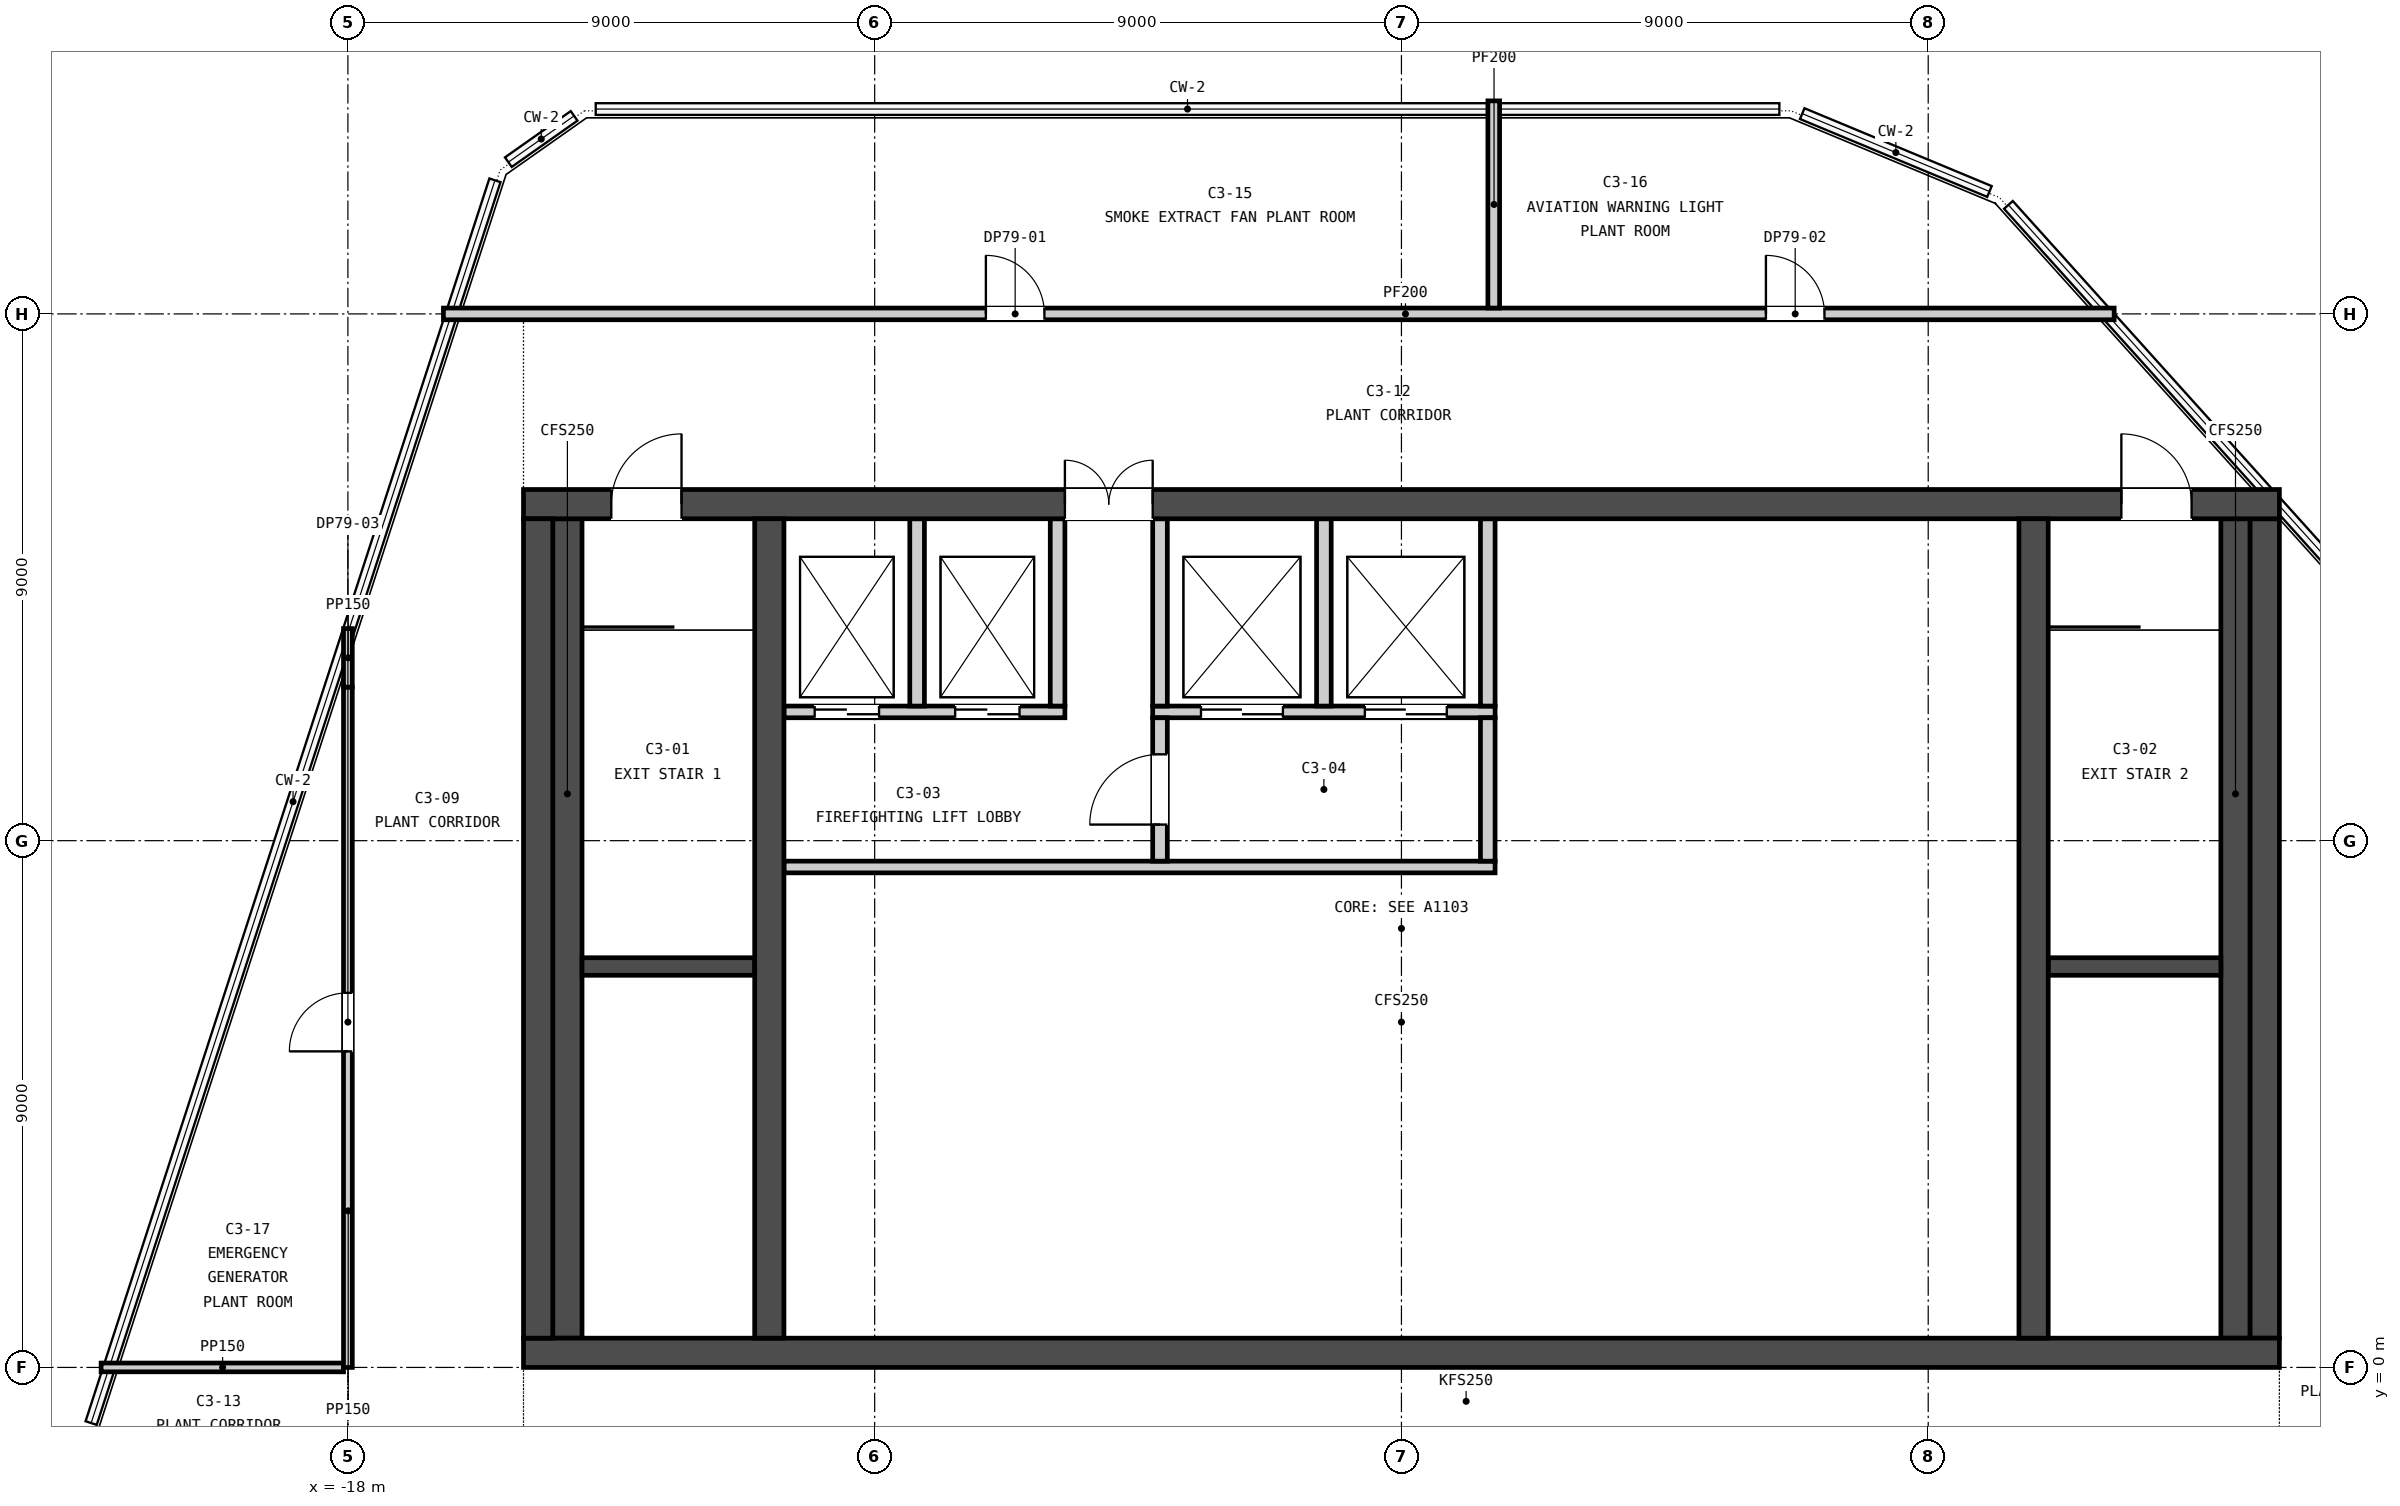
"""IFC4 building model, lengths in metres.
Left out: names, types, materials, properties, quantities, classifications, styles, units other than length and angle.
Written with IfcOpenShell. Run it as: python <this file> out.ifc"""

import sys

from ifc_helpers import new_model, si_unit, direction, frame, frame_2d, origin, place, context, subcontext, project, spatial, rectangle, extrude, element, fill, save


model = new_model("IFC4")
c1 = context("Model", 3, precision=1e-05, world=origin(), true_north=direction((0.0, 1.0)))
c2 = subcontext(c1, "Body", "Model", "MODEL_VIEW")
j1 = project(units=[si_unit("LENGTHUNIT", "METRE"), si_unit("PLANEANGLEUNIT", "RADIAN")], contexts=[c1])
p1 = place(None, origin())
s1 = spatial("IfcSite", under=j1, at=p1, CompositionType="ELEMENT")
p2 = place(p1, origin())
s2 = spatial("IfcBuilding", under=s1, at=p2, CompositionType="ELEMENT")
p3 = place(p2, frame((0.0, 0.0, 311.1)))
s3 = spatial("IfcBuildingStorey", under=s2, at=p3, CompositionType="ELEMENT", Elevation=311.1)
p4 = place(p3, frame((-15.0, 0.25, -0.25), z_axis=(0.0, 0.0, 1.0), x_axis=(1.0, 0.0, 0.0)))
e1 = element("IfcWall", 1, at=p4, inside=s3, PredefinedType="SOLIDWALL", context=c2, shape_type="SweptSolid", body=[
    extrude(rectangle(XDim=30.0, YDim=0.5, at=frame_2d((15.0, 0.0))), origin(), (0.0, 0.0, 1.0), 4.5),
])
p5 = place(p3, frame((-15.0, 14.75, -0.25), z_axis=(0.0, 0.0, 1.0), x_axis=(1.0, 0.0, 0.0)))
e2 = element("IfcWall", 2, at=p5, inside=s3, PredefinedType="SOLIDWALL", context=c2, shape_type="SweptSolid", body=[
    extrude(rectangle(XDim=30.0, YDim=0.5, at=frame_2d((15.0, 0.0))), origin(), (0.0, 0.0, 1.0), 4.5),
])
p6 = place(p5, frame((1.5, 0.0, 0.25)))
e3 = element("IfcOpeningElement", 3, at=p6, cuts=e2, PredefinedType="OPENING", context=c2, shape_type="SweptSolid", body=[
    extrude(rectangle(XDim=1.2, YDim=2.1, at=frame_2d((0.6, 1.05))), frame((0.0, 0.26, 0.0), z_axis=(0.0, -1.0, 0.0), x_axis=(1.0, 0.0, 0.0)), (0.0, 0.0, 1.0), 0.52),
])
p7 = place(p5, frame((27.3, 0.0, 0.25)))
e4 = element("IfcOpeningElement", 4, at=p7, cuts=e2, PredefinedType="OPENING", context=c2, shape_type="SweptSolid", body=[
    extrude(rectangle(XDim=1.2, YDim=2.1, at=frame_2d((0.6, 1.05))), frame((0.0, 0.26, 0.0), z_axis=(0.0, -1.0, 0.0), x_axis=(1.0, 0.0, 0.0)), (0.0, 0.0, 1.0), 0.52),
])
p8 = place(p5, frame((9.25, 0.0, 0.25)))
e5 = element("IfcOpeningElement", 5, at=p8, cuts=e2, PredefinedType="OPENING", context=c2, shape_type="SweptSolid", body=[
    extrude(rectangle(XDim=1.5, YDim=2.1, at=frame_2d((0.75, 1.05))), frame((0.0, 0.26, 0.0), z_axis=(0.0, -1.0, 0.0), x_axis=(1.0, 0.0, 0.0)), (0.0, 0.0, 1.0), 0.52),
])
for number, where, z_axis, x_axis in (
    (6, (-14.75, 0.5, -0.25), (0.0, 0.0, 1.0), (0.0, 1.0, 0.0)),
    (7, (14.75, 0.5, -0.25), (0.0, 0.0, 1.0), (0.0, 1.0, 0.0)),
    (8, (-10.8, 0.5, -0.25), (0.0, 0.0, 1.0), (0.0, 1.0, 0.0)),
    (9, (10.8, 0.5, -0.25), (0.0, 0.0, 1.0), (0.0, 1.0, 0.0)),
):
    element("IfcWall", number, at=place(p3, frame(where, z_axis=z_axis, x_axis=x_axis)), inside=s3, PredefinedType="SOLIDWALL", context=c2, shape_type="SweptSolid", body=[
        extrude(rectangle(XDim=14.0, YDim=0.5, at=frame_2d((7.0, 0.0))), origin(), (0.0, 0.0, 1.0), 4.5),
    ])
p9 = place(p3, frame((-14.0, 6.85, 0.0), z_axis=(0.0, 0.0, 1.0), x_axis=(1.0, 0.0, 0.0)))
e10 = element("IfcWall", 10, at=p9, inside=s3, PredefinedType="SOLIDWALL", context=c2, shape_type="SweptSolid", body=[
    extrude(rectangle(XDim=2.95, YDim=0.3, at=frame_2d((1.475, 0.0))), origin(), (0.0, 0.0, 1.0), 4.25),
])
p10 = place(p3, frame((-14.25, 0.5, 0.0), z_axis=(0.0, 0.0, 1.0), x_axis=(0.0, 1.0, 0.0)))
e11 = element("IfcWall", 11, at=p10, inside=s3, PredefinedType="SOLIDWALL", context=c2, shape_type="SweptSolid", body=[
    extrude(rectangle(XDim=14.0, YDim=0.5, at=frame_2d((7.0, 0.0))), origin(), (0.0, 0.0, 1.0), 4.25),
])
p11 = place(p3, frame((11.05, 6.85, 0.0), z_axis=(0.0, 0.0, 1.0), x_axis=(1.0, 0.0, 0.0)))
e12 = element("IfcWall", 12, at=p11, inside=s3, PredefinedType="SOLIDWALL", context=c2, shape_type="SweptSolid", body=[
    extrude(rectangle(XDim=2.95, YDim=0.3, at=frame_2d((1.475, 0.0))), origin(), (0.0, 0.0, 1.0), 4.25),
])
p12 = place(p3, frame((14.25, 0.5, 0.0), z_axis=(0.0, 0.0, 1.0), x_axis=(0.0, 1.0, 0.0)))
e13 = element("IfcWall", 13, at=p12, inside=s3, PredefinedType="SOLIDWALL", context=c2, shape_type="SweptSolid", body=[
    extrude(rectangle(XDim=14.0, YDim=0.5, at=frame_2d((7.0, 0.0))), origin(), (0.0, 0.0, 1.0), 4.25),
])
p13 = place(p3, frame((-10.55, 8.55, 0.0), z_axis=(0.0, 0.0, 1.0), x_axis=(1.0, 0.0, 0.0)))
e14 = element("IfcWall", 14, at=p13, inside=s3, PredefinedType="PARTITIONING", context=c2, shape_type="SweptSolid", body=[
    extrude(rectangle(XDim=12.15, YDim=0.2, at=frame_2d((6.075, 0.0))), origin(), (0.0, 0.0, 1.0), 4.25),
])
p14 = place(p3, frame((-10.55, 11.2, 0.0), z_axis=(0.0, 0.0, 1.0), x_axis=(1.0, 0.0, 0.0)))
e15 = element("IfcWall", 15, at=p14, inside=s3, PredefinedType="PARTITIONING", context=c2, shape_type="SweptSolid", body=[
    extrude(rectangle(XDim=4.8, YDim=0.2, at=frame_2d((2.4, 0.0))), origin(), (0.0, 0.0, 1.0), 4.25),
])
p15 = place(p14, frame((0.525, 0.0, 0.0)))
e16 = element("IfcOpeningElement", 16, at=p15, cuts=e15, PredefinedType="OPENING", context=c2, shape_type="SweptSolid", body=[
    extrude(rectangle(XDim=1.1, YDim=2.1, at=frame_2d((0.55, 1.05))), frame((0.0, 0.11, 0.0), z_axis=(0.0, -1.0, 0.0), x_axis=(1.0, 0.0, 0.0)), (0.0, 0.0, 1.0), 0.22),
])
p16 = place(p14, frame((2.925, 0.0, 0.0)))
e17 = element("IfcOpeningElement", 17, at=p16, cuts=e15, PredefinedType="OPENING", context=c2, shape_type="SweptSolid", body=[
    extrude(rectangle(XDim=1.1, YDim=2.1, at=frame_2d((0.55, 1.05))), frame((0.0, 0.11, 0.0), z_axis=(0.0, -1.0, 0.0), x_axis=(1.0, 0.0, 0.0)), (0.0, 0.0, 1.0), 0.22),
])
p17 = place(p3, frame((-4.25, 11.2, 0.0), z_axis=(0.0, 0.0, 1.0), x_axis=(1.0, 0.0, 0.0)))
e18 = element("IfcWall", 18, at=p17, inside=s3, PredefinedType="PARTITIONING", context=c2, shape_type="SweptSolid", body=[
    extrude(rectangle(XDim=5.85, YDim=0.2, at=frame_2d((2.925, 0.0))), origin(), (0.0, 0.0, 1.0), 4.25),
])
p18 = place(p17, frame((0.825, 0.0, 0.0)))
e19 = element("IfcOpeningElement", 19, at=p18, cuts=e18, PredefinedType="OPENING", context=c2, shape_type="SweptSolid", body=[
    extrude(rectangle(XDim=1.4, YDim=2.1, at=frame_2d((0.7, 1.05))), frame((0.0, 0.11, 0.0), z_axis=(0.0, -1.0, 0.0), x_axis=(1.0, 0.0, 0.0)), (0.0, 0.0, 1.0), 0.22),
])
p19 = place(p17, frame((3.625, 0.0, 0.0)))
e20 = element("IfcOpeningElement", 20, at=p19, cuts=e18, PredefinedType="OPENING", context=c2, shape_type="SweptSolid", body=[
    extrude(rectangle(XDim=1.4, YDim=2.1, at=frame_2d((0.7, 1.05))), frame((0.0, 0.11, 0.0), z_axis=(0.0, -1.0, 0.0), x_axis=(1.0, 0.0, 0.0)), (0.0, 0.0, 1.0), 0.22),
])
p20 = place(p3, frame((-4.125, 8.65, 0.0), z_axis=(0.0, 0.0, 1.0), x_axis=(0.0, 1.0, 0.0)))
e21 = element("IfcWall", 21, at=p20, inside=s3, PredefinedType="PARTITIONING", context=c2, shape_type="SweptSolid", body=[
    extrude(rectangle(XDim=2.45, YDim=0.25, at=frame_2d((1.225, 0.0))), origin(), (0.0, 0.0, 1.0), 4.25),
])
p21 = place(p20, frame((0.625, 0.0, 0.0)))
e22 = element("IfcOpeningElement", 22, at=p21, cuts=e21, PredefinedType="OPENING", context=c2, shape_type="SweptSolid", body=[
    extrude(rectangle(XDim=1.2, YDim=2.1, at=frame_2d((0.6, 1.05))), frame((0.0, 0.135, 0.0), z_axis=(0.0, -1.0, 0.0), x_axis=(1.0, 0.0, 0.0)), (0.0, 0.0, 1.0), 0.27),
])
p22 = place(p3, frame((1.475, 8.65, 0.0), z_axis=(0.0, 0.0, 1.0), x_axis=(0.0, 1.0, 0.0)))
e23 = element("IfcWall", 23, at=p22, inside=s3, PredefinedType="PARTITIONING", context=c2, shape_type="SweptSolid", body=[
    extrude(rectangle(XDim=2.45, YDim=0.25, at=frame_2d((1.225, 0.0))), origin(), (0.0, 0.0, 1.0), 4.25),
])
for number, where, z_axis, x_axis in (
    (24, (-8.275, 11.3, 0.0), (0.0, 0.0, 1.0), (0.0, 1.0, 0.0)),
    (25, (-5.875, 11.3, 0.0), (0.0, 0.0, 1.0), (0.0, 1.0, 0.0)),
    (26, (-4.125, 11.3, 0.0), (0.0, 0.0, 1.0), (0.0, 1.0, 0.0)),
    (27, (-1.325, 11.3, 0.0), (0.0, 0.0, 1.0), (0.0, 1.0, 0.0)),
    (28, (1.475, 11.3, 0.0), (0.0, 0.0, 1.0), (0.0, 1.0, 0.0)),
):
    element("IfcWall", number, at=place(p3, frame(where, z_axis=z_axis, x_axis=x_axis)), inside=s3, PredefinedType="PARTITIONING", context=c2, shape_type="SweptSolid", body=[
        extrude(rectangle(XDim=3.2, YDim=0.25, at=frame_2d((1.6, 0.0))), origin(), (0.0, 0.0, 1.0), 4.25),
    ])
p23 = place(p3, frame((-22.216, 0.0, 0.0), z_axis=(0.0, 0.0, 1.0), x_axis=(1.0, 0.0, 0.0)))
e29 = element("IfcWall", 29, at=p23, inside=s3, PredefinedType="PARTITIONING", context=c2, shape_type="SweptSolid", body=[
    extrude(rectangle(XDim=4.141, YDim=0.15, at=frame_2d((2.071, 0.0))), origin(), (0.0, 0.0, 1.0), 4.25),
])
p24 = place(p3, frame((-16.368, 18.0, 0.0), z_axis=(0.0, 0.0, 1.0), x_axis=(1.0, 0.0, 0.0)))
e30 = element("IfcWall", 30, at=p24, inside=s3, PredefinedType="PARTITIONING", context=c2, shape_type="SweptSolid", body=[
    extrude(rectangle(XDim=28.545, YDim=0.2, at=frame_2d((14.272, 0.0))), origin(), (0.0, 0.0, 1.0), 4.25),
])
p25 = place(p24, frame((9.268, 0.0, 0.0)))
e31 = element("IfcOpeningElement", 31, at=p25, cuts=e30, PredefinedType="OPENING", context=c2, shape_type="SweptSolid", body=[
    extrude(rectangle(XDim=1.0, YDim=2.1, at=frame_2d((0.5, 1.05))), frame((0.0, 0.11, 0.0), z_axis=(0.0, -1.0, 0.0), x_axis=(1.0, 0.0, 0.0)), (0.0, 0.0, 1.0), 0.22),
])
p26 = place(p24, frame((22.595, 0.0, 0.0)))
e32 = element("IfcOpeningElement", 32, at=p26, cuts=e30, PredefinedType="OPENING", context=c2, shape_type="SweptSolid", body=[
    extrude(rectangle(XDim=1.0, YDim=2.1, at=frame_2d((0.5, 1.05))), frame((0.0, 0.11, 0.0), z_axis=(0.0, -1.0, 0.0), x_axis=(1.0, 0.0, 0.0)), (0.0, 0.0, 1.0), 0.22),
])
p27 = place(p3, frame((-18.0, 0.0, 0.0), z_axis=(0.0, 0.0, 1.0), x_axis=(0.0, 1.0, 0.0)))
e33 = element("IfcWall", 33, at=p27, inside=s3, PredefinedType="PARTITIONING", context=c2, shape_type="SweptSolid", body=[
    extrude(rectangle(XDim=11.624, YDim=0.15, at=frame_2d((5.812, 0.0))), origin(), (0.0, 0.0, 1.0), 4.25),
])
p28 = place(p27, frame((5.4, 0.0, 0.0)))
e34 = element("IfcOpeningElement", 34, at=p28, cuts=e33, PredefinedType="OPENING", context=c2, shape_type="SweptSolid", body=[
    extrude(rectangle(XDim=1.0, YDim=2.1, at=frame_2d((0.5, 1.05))), frame((0.0, 0.085, 0.0), z_axis=(0.0, -1.0, 0.0), x_axis=(1.0, 0.0, 0.0)), (0.0, 0.0, 1.0), 0.17),
])
p29 = place(p3, frame((-18.0, 11.624, 0.0), z_axis=(0.0, 0.0, 1.0), x_axis=(0.0, 1.0, 0.0)))
e35 = element("IfcWall", 35, at=p29, inside=s3, PredefinedType="PARTITIONING", context=c2, shape_type="SweptSolid", body=[
    extrude(rectangle(XDim=1.0, YDim=0.15, at=frame_2d((0.5, 0.0))), origin(), (0.0, 0.0, 1.0), 3.634),
])
p30 = place(p3, frame((1.577, 18.1, 0.0), z_axis=(0.0, 0.0, 1.0), x_axis=(0.0, 1.0, 0.0)))
e36 = element("IfcWall", 36, at=p30, inside=s3, PredefinedType="PARTITIONING", context=c2, shape_type="SweptSolid", body=[
    extrude(rectangle(XDim=3.54, YDim=0.2, at=frame_2d((1.77, 0.0))), origin(), (0.0, 0.0, 1.0), 4.25),
])
p31 = place(p6, origin())
e37 = element("IfcDoor", 37, at=p31, inside=s3, OperationType="SINGLE_SWING_RIGHT", PredefinedType="DOOR", context=c2, shape_type="SweptSolid", body=[
    extrude(rectangle(XDim=1.2, YDim=2.1, at=frame_2d((0.6, 1.05))), frame((0.0, 0.025, 0.0), z_axis=(0.0, -1.0, 0.0), x_axis=(1.0, 0.0, 0.0)), (0.0, 0.0, 1.0), 0.05),
])
fill(e3, e37)
p32 = place(p7, origin())
e38 = element("IfcDoor", 38, at=p32, inside=s3, OperationType="SINGLE_SWING_LEFT", PredefinedType="DOOR", context=c2, shape_type="SweptSolid", body=[
    extrude(rectangle(XDim=1.2, YDim=2.1, at=frame_2d((0.6, 1.05))), frame((0.0, 0.025, 0.0), z_axis=(0.0, -1.0, 0.0), x_axis=(1.0, 0.0, 0.0)), (0.0, 0.0, 1.0), 0.05),
])
fill(e4, e38)
p33 = place(p21, origin())
e39 = element("IfcDoor", 39, at=p33, inside=s3, OperationType="SINGLE_SWING_LEFT", PredefinedType="DOOR", context=c2, shape_type="SweptSolid", body=[
    extrude(rectangle(XDim=1.2, YDim=2.1, at=frame_2d((0.6, 1.05))), frame((0.0, 0.025, 0.0), z_axis=(0.0, -1.0, 0.0), x_axis=(1.0, 0.0, 0.0)), (0.0, 0.0, 1.0), 0.05),
])
fill(e22, e39)
p34 = place(p15, origin())
e40 = element("IfcDoor", 40, at=p34, inside=s3, OperationType="DOUBLE_DOOR_SLIDING", PredefinedType="DOOR", context=c2, shape_type="SweptSolid", body=[
    extrude(rectangle(XDim=1.1, YDim=2.1, at=frame_2d((0.55, 1.05))), frame((0.0, 0.025, 0.0), z_axis=(0.0, -1.0, 0.0), x_axis=(1.0, 0.0, 0.0)), (0.0, 0.0, 1.0), 0.05),
])
fill(e16, e40)
p35 = place(p16, origin())
e41 = element("IfcDoor", 41, at=p35, inside=s3, OperationType="DOUBLE_DOOR_SLIDING", PredefinedType="DOOR", context=c2, shape_type="SweptSolid", body=[
    extrude(rectangle(XDim=1.1, YDim=2.1, at=frame_2d((0.55, 1.05))), frame((0.0, 0.025, 0.0), z_axis=(0.0, -1.0, 0.0), x_axis=(1.0, 0.0, 0.0)), (0.0, 0.0, 1.0), 0.05),
])
fill(e17, e41)
p36 = place(p18, origin())
e42 = element("IfcDoor", 42, at=p36, inside=s3, OperationType="DOUBLE_DOOR_SLIDING", PredefinedType="DOOR", context=c2, shape_type="SweptSolid", body=[
    extrude(rectangle(XDim=1.4, YDim=2.1, at=frame_2d((0.7, 1.05))), frame((0.0, 0.025, 0.0), z_axis=(0.0, -1.0, 0.0), x_axis=(1.0, 0.0, 0.0)), (0.0, 0.0, 1.0), 0.05),
])
fill(e19, e42)
p37 = place(p19, origin())
e43 = element("IfcDoor", 43, at=p37, inside=s3, OperationType="DOUBLE_DOOR_SLIDING", PredefinedType="DOOR", context=c2, shape_type="SweptSolid", body=[
    extrude(rectangle(XDim=1.4, YDim=2.1, at=frame_2d((0.7, 1.05))), frame((0.0, 0.025, 0.0), z_axis=(0.0, -1.0, 0.0), x_axis=(1.0, 0.0, 0.0)), (0.0, 0.0, 1.0), 0.05),
])
fill(e20, e43)
p38 = place(p8, origin())
e44 = element("IfcDoor", 44, at=p38, inside=s3, OperationType="DOUBLE_DOOR_SINGLE_SWING", PredefinedType="DOOR", context=c2, shape_type="SweptSolid", body=[
    extrude(rectangle(XDim=1.5, YDim=2.1, at=frame_2d((0.75, 1.05))), frame((0.0, 0.025, 0.0), z_axis=(0.0, -1.0, 0.0), x_axis=(1.0, 0.0, 0.0)), (0.0, 0.0, 1.0), 0.05),
])
fill(e5, e44)
p39 = place(p25, origin())
e45 = element("IfcDoor", 45, at=p39, inside=s3, OperationType="SINGLE_SWING_LEFT", PredefinedType="DOOR", context=c2, shape_type="SweptSolid", body=[
    extrude(rectangle(XDim=1.0, YDim=2.1, at=frame_2d((0.5, 1.05))), frame((0.0, 0.025, 0.0), z_axis=(0.0, -1.0, 0.0), x_axis=(1.0, 0.0, 0.0)), (0.0, 0.0, 1.0), 0.05),
])
fill(e31, e45)
p40 = place(p26, origin())
e46 = element("IfcDoor", 46, at=p40, inside=s3, OperationType="SINGLE_SWING_LEFT", PredefinedType="DOOR", context=c2, shape_type="SweptSolid", body=[
    extrude(rectangle(XDim=1.0, YDim=2.1, at=frame_2d((0.5, 1.05))), frame((0.0, 0.025, 0.0), z_axis=(0.0, -1.0, 0.0), x_axis=(1.0, 0.0, 0.0)), (0.0, 0.0, 1.0), 0.05),
])
fill(e32, e46)
p41 = place(p28, origin())
e47 = element("IfcDoor", 47, at=p41, inside=s3, OperationType="SINGLE_SWING_LEFT", PredefinedType="DOOR", context=c2, shape_type="SweptSolid", body=[
    extrude(rectangle(XDim=1.0, YDim=2.1, at=frame_2d((0.5, 1.05))), frame((0.0, 0.025, 0.0), z_axis=(0.0, -1.0, 0.0), x_axis=(1.0, 0.0, 0.0)), (0.0, 0.0, 1.0), 0.05),
])
fill(e34, e47)
save(model, sys.argv[1])
